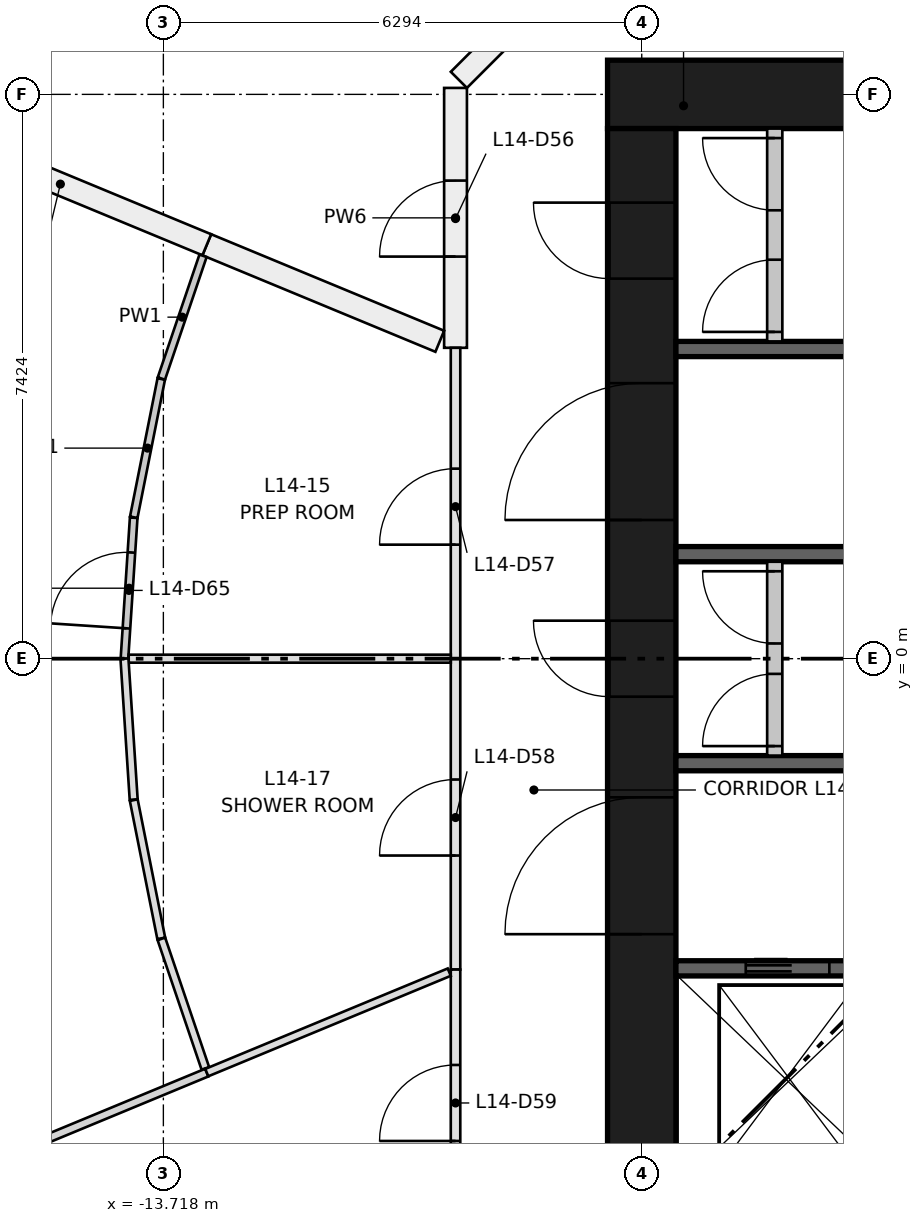
"""IFC4 building model, lengths in metres.
Left out: names, types, materials, properties, quantities, classifications, styles, units other than length and angle.
Written with IfcOpenShell. Run it as: python <this file> out.ifc"""

import sys

from ifc_helpers import new_model, si_unit, direction, frame, frame_2d, origin, place, context, subcontext, project, spatial, rectangle, extrude, element, fill, save


model = new_model("IFC4")
c1 = context("Model", 3, precision=1e-05, world=origin(), true_north=direction((0.0, 1.0)))
c2 = subcontext(c1, "Body", "Model", "MODEL_VIEW")
j1 = project(units=[si_unit("LENGTHUNIT", "METRE"), si_unit("PLANEANGLEUNIT", "RADIAN")], contexts=[c1])
p1 = place(None, origin())
s1 = spatial("IfcSite", under=j1, at=p1, CompositionType="ELEMENT")
p2 = place(p1, origin())
s2 = spatial("IfcBuilding", under=s1, at=p2, CompositionType="ELEMENT")
p3 = place(p2, frame((0.0, 0.0, 55.4)))
s3 = spatial("IfcBuildingStorey", under=s2, at=p3, CompositionType="ELEMENT", Elevation=55.4)
p4 = place(p3, frame((-7.874, 7.424, 0.0), z_axis=(0.0, 0.0, 1.0), x_axis=(1.0, 0.0, 0.0)))
e1 = element("IfcWall", 1, at=p4, inside=s3, PredefinedType="SHEAR", context=c2, shape_type="SweptSolid", body=[
    extrude(rectangle(XDim=15.748, YDim=0.9, at=frame_2d((7.874, 0.0))), origin(), (0.0, 0.0, 1.0), 3.65),
])
p5 = place(p3, frame((-7.424, -6.974, 0.0), z_axis=(0.0, 0.0, 1.0), x_axis=(0.0, 1.0, 0.0)))
e2 = element("IfcWall", 2, at=p5, inside=s3, PredefinedType="SHEAR", context=c2, shape_type="SweptSolid", body=[
    extrude(rectangle(XDim=13.948, YDim=0.9, at=frame_2d((6.974, 0.0))), origin(), (0.0, 0.0, 1.0), 3.65),
])
p6 = place(p5, frame((6.474, 0.0, 0.0)))
e3 = element("IfcOpeningElement", 3, at=p6, cuts=e2, PredefinedType="OPENING", context=c2, shape_type="SweptSolid", body=[
    extrude(rectangle(XDim=1.0, YDim=2.1, at=frame_2d((0.5, 1.05))), frame((0.0, 0.46, 0.0), z_axis=(0.0, -1.0, 0.0), x_axis=(1.0, 0.0, 0.0)), (0.0, 0.0, 1.0), 0.92),
])
p7 = place(p5, frame((3.35, 0.0, 0.0)))
e4 = element("IfcOpeningElement", 4, at=p7, cuts=e2, PredefinedType="OPENING", context=c2, shape_type="SweptSolid", body=[
    extrude(rectangle(XDim=1.8, YDim=2.1, at=frame_2d((0.9, 1.05))), frame((0.0, 0.46, 0.0), z_axis=(0.0, -1.0, 0.0), x_axis=(1.0, 0.0, 0.0)), (0.0, 0.0, 1.0), 0.92),
])
p8 = place(p5, frame((8.799, 0.0, 0.0)))
e5 = element("IfcOpeningElement", 5, at=p8, cuts=e2, PredefinedType="OPENING", context=c2, shape_type="SweptSolid", body=[
    extrude(rectangle(XDim=1.8, YDim=2.1, at=frame_2d((0.9, 1.05))), frame((0.0, 0.46, 0.0), z_axis=(0.0, -1.0, 0.0), x_axis=(1.0, 0.0, 0.0)), (0.0, 0.0, 1.0), 0.92),
])
p9 = place(p5, frame((11.974, 0.0, 0.0)))
e6 = element("IfcOpeningElement", 6, at=p9, cuts=e2, PredefinedType="OPENING", context=c2, shape_type="SweptSolid", body=[
    extrude(rectangle(XDim=1.0, YDim=2.1, at=frame_2d((0.5, 1.05))), frame((0.0, 0.46, 0.0), z_axis=(0.0, -1.0, 0.0), x_axis=(1.0, 0.0, 0.0)), (0.0, 0.0, 1.0), 0.92),
])
p10 = place(p3, frame((-6.974, -4.074, 0.0), z_axis=(0.0, 0.0, 1.0), x_axis=(1.0, 0.0, 0.0)))
e7 = element("IfcWall", 7, at=p10, inside=s3, PredefinedType="SHEAR", context=c2, shape_type="SweptSolid", body=[
    extrude(rectangle(XDim=13.948, YDim=0.2, at=frame_2d((6.974, 0.0))), origin(), (0.0, 0.0, 1.0), 3.3),
])
p11 = place(p10, frame((0.918, 0.0, 0.0)))
e8 = element("IfcOpeningElement", 8, at=p11, cuts=e7, PredefinedType="OPENING", context=c2, shape_type="SweptSolid", body=[
    extrude(rectangle(XDim=1.1, YDim=2.1, at=frame_2d((0.55, 1.05))), frame((0.0, 0.11, 0.0), z_axis=(0.0, -1.0, 0.0), x_axis=(1.0, 0.0, 0.0)), (0.0, 0.0, 1.0), 0.22),
])
p12 = place(p10, frame((4.055, 0.0, 0.0)))
e9 = element("IfcOpeningElement", 9, at=p12, cuts=e7, PredefinedType="OPENING", context=c2, shape_type="SweptSolid", body=[
    extrude(rectangle(XDim=1.1, YDim=2.1, at=frame_2d((0.55, 1.05))), frame((0.0, 0.11, 0.0), z_axis=(0.0, -1.0, 0.0), x_axis=(1.0, 0.0, 0.0)), (0.0, 0.0, 1.0), 0.22),
])
p13 = place(p10, frame((6.658, 0.0, 0.0)))
e10 = element("IfcOpeningElement", 10, at=p13, cuts=e7, PredefinedType="OPENING", context=c2, shape_type="SweptSolid", body=[
    extrude(rectangle(XDim=1.0, YDim=2.1, at=frame_2d((0.5, 1.05))), frame((0.0, 0.11, 0.0), z_axis=(0.0, -1.0, 0.0), x_axis=(1.0, 0.0, 0.0)), (0.0, 0.0, 1.0), 0.22),
])
p14 = place(p10, frame((8.627, 0.0, 0.0)))
e11 = element("IfcOpeningElement", 11, at=p14, cuts=e7, PredefinedType="OPENING", context=c2, shape_type="SweptSolid", body=[
    extrude(rectangle(XDim=1.0, YDim=2.1, at=frame_2d((0.5, 1.05))), frame((0.0, 0.11, 0.0), z_axis=(0.0, -1.0, 0.0), x_axis=(1.0, 0.0, 0.0)), (0.0, 0.0, 1.0), 0.22),
])
p15 = place(p10, frame((10.595, 0.0, 0.0)))
e12 = element("IfcOpeningElement", 12, at=p15, cuts=e7, PredefinedType="OPENING", context=c2, shape_type="SweptSolid", body=[
    extrude(rectangle(XDim=1.0, YDim=2.1, at=frame_2d((0.5, 1.05))), frame((0.0, 0.11, 0.0), z_axis=(0.0, -1.0, 0.0), x_axis=(1.0, 0.0, 0.0)), (0.0, 0.0, 1.0), 0.22),
])
p16 = place(p10, frame((12.564, 0.0, 0.0)))
e13 = element("IfcOpeningElement", 13, at=p16, cuts=e7, PredefinedType="OPENING", context=c2, shape_type="SweptSolid", body=[
    extrude(rectangle(XDim=1.0, YDim=2.1, at=frame_2d((0.5, 1.05))), frame((0.0, 0.11, 0.0), z_axis=(0.0, -1.0, 0.0), x_axis=(1.0, 0.0, 0.0)), (0.0, 0.0, 1.0), 0.22),
])
p17 = place(p3, frame((-6.974, 4.074, 0.0), z_axis=(0.0, 0.0, 1.0), x_axis=(1.0, 0.0, 0.0)))
e14 = element("IfcWall", 14, at=p17, inside=s3, PredefinedType="SHEAR", context=c2, shape_type="SweptSolid", body=[
    extrude(rectangle(XDim=6.974, YDim=0.2, at=frame_2d((3.487, 0.0))), origin(), (0.0, 0.0, 1.0), 3.3),
])
for number, where, z_axis, x_axis in (
    (15, (-6.974, -1.375, 0.0), (0.0, 0.0, 1.0), (1.0, 0.0, 0.0)),
    (16, (-6.974, 1.375, 0.0), (0.0, 0.0, 1.0), (1.0, 0.0, 0.0)),
):
    element("IfcWall", number, at=place(p3, frame(where, z_axis=z_axis, x_axis=x_axis)), inside=s3, PredefinedType="SHEAR", context=c2, shape_type="SweptSolid", body=[
        extrude(rectangle(XDim=2.6, YDim=0.2, at=frame_2d((1.3, 0.0))), origin(), (0.0, 0.0, 1.0), 3.3),
    ])
p18 = place(p3, frame((-5.674, -1.275, 0.0), z_axis=(0.0, 0.0, 1.0), x_axis=(0.0, 1.0, 0.0)))
e17 = element("IfcWall", 17, at=p18, inside=s3, PredefinedType="PARTITIONING", context=c2, shape_type="SweptSolid", body=[
    extrude(rectangle(XDim=2.55, YDim=0.2, at=frame_2d((1.275, 0.0))), origin(), (0.0, 0.0, 1.0), 3.3),
])
p19 = place(p18, frame((0.125, 0.0, 0.0)))
e18 = element("IfcOpeningElement", 18, at=p19, cuts=e17, PredefinedType="OPENING", context=c2, shape_type="SweptSolid", body=[
    extrude(rectangle(XDim=0.95, YDim=2.1, at=frame_2d((0.475, 1.05))), frame((0.0, 0.11, 0.0), z_axis=(0.0, -1.0, 0.0), x_axis=(1.0, 0.0, 0.0)), (0.0, 0.0, 1.0), 0.22),
])
p20 = place(p18, frame((1.475, 0.0, 0.0)))
e19 = element("IfcOpeningElement", 19, at=p20, cuts=e17, PredefinedType="OPENING", context=c2, shape_type="SweptSolid", body=[
    extrude(rectangle(XDim=0.95, YDim=2.1, at=frame_2d((0.475, 1.05))), frame((0.0, 0.11, 0.0), z_axis=(0.0, -1.0, 0.0), x_axis=(1.0, 0.0, 0.0)), (0.0, 0.0, 1.0), 0.22),
])
p21 = place(p3, frame((-5.674, 4.174, 0.0), z_axis=(0.0, 0.0, 1.0), x_axis=(0.0, 1.0, 0.0)))
e20 = element("IfcWall", 20, at=p21, inside=s3, PredefinedType="PARTITIONING", context=c2, shape_type="SweptSolid", body=[
    extrude(rectangle(XDim=2.8, YDim=0.2, at=frame_2d((1.4, 0.0))), origin(), (0.0, 0.0, 1.0), 3.3),
])
p22 = place(p21, frame((0.125, 0.0, 0.0)))
e21 = element("IfcOpeningElement", 21, at=p22, cuts=e20, PredefinedType="OPENING", context=c2, shape_type="SweptSolid", body=[
    extrude(rectangle(XDim=0.95, YDim=2.1, at=frame_2d((0.475, 1.05))), frame((0.0, 0.11, 0.0), z_axis=(0.0, -1.0, 0.0), x_axis=(1.0, 0.0, 0.0)), (0.0, 0.0, 1.0), 0.22),
])
p23 = place(p21, frame((1.725, 0.0, 0.0)))
e22 = element("IfcOpeningElement", 22, at=p23, cuts=e20, PredefinedType="OPENING", context=c2, shape_type="SweptSolid", body=[
    extrude(rectangle(XDim=0.95, YDim=2.1, at=frame_2d((0.475, 1.05))), frame((0.0, 0.11, 0.0), z_axis=(0.0, -1.0, 0.0), x_axis=(1.0, 0.0, 0.0)), (0.0, 0.0, 1.0), 0.22),
])
p24 = place(p3, frame((-9.874, 4.09, 0.0), z_axis=(0.0, 0.0, 1.0), x_axis=(0.0, 1.0, 0.0)))
e23 = element("IfcWall", 23, at=p24, inside=s3, PredefinedType="PARTITIONING", context=c2, shape_type="SweptSolid", body=[
    extrude(rectangle(XDim=3.419, YDim=0.3, at=frame_2d((1.709, 0.0))), origin(), (0.0, 0.0, 1.0), 3.3),
])
p25 = place(p24, frame((1.2, 0.0, 0.0)))
e24 = element("IfcOpeningElement", 24, at=p25, cuts=e23, PredefinedType="OPENING", context=c2, shape_type="SweptSolid", body=[
    extrude(rectangle(XDim=1.0, YDim=2.1, at=frame_2d((0.5, 1.05))), frame((0.0, 0.16, 0.0), z_axis=(0.0, -1.0, 0.0), x_axis=(1.0, 0.0, 0.0)), (0.0, 0.0, 1.0), 0.32),
])
p26 = place(p3, frame((-9.83, 7.615, 0.0), z_axis=(0.0, 0.0, 1.0), x_axis=(0.70718471217, 0.707028841614, 0.0)))
e25 = element("IfcWall", 25, at=p26, inside=s3, PredefinedType="PARTITIONING", context=c2, shape_type="SweptSolid", body=[
    extrude(rectangle(XDim=1.566, YDim=0.3, at=frame_2d((0.783, 0.0))), origin(), (0.0, 0.0, 1.0), 3.3),
])
p27 = place(p3, frame((-9.874, 0.0, 0.0), z_axis=(0.0, 0.0, 1.0), x_axis=(0.0, 1.0, 0.0)))
e26 = element("IfcWall", 26, at=p27, inside=s3, PredefinedType="PARTITIONING", context=c2, shape_type="SweptSolid", body=[
    extrude(rectangle(XDim=4.09, YDim=0.125, at=frame_2d((2.045, 0.0))), origin(), (0.0, 0.0, 1.0), 3.3),
])
p28 = place(p27, frame((1.5, 0.0, 0.0)))
e27 = element("IfcOpeningElement", 27, at=p28, cuts=e26, PredefinedType="OPENING", context=c2, shape_type="SweptSolid", body=[
    extrude(rectangle(XDim=1.0, YDim=2.1, at=frame_2d((0.5, 1.05))), frame((0.0, 0.073, 0.0), z_axis=(0.0, -1.0, 0.0), x_axis=(1.0, 0.0, 0.0)), (0.0, 0.0, 1.0), 0.145),
])
p29 = place(p3, frame((-9.874, -4.09, 0.0), z_axis=(0.0, 0.0, 1.0), x_axis=(0.0, 1.0, 0.0)))
e28 = element("IfcWall", 28, at=p29, inside=s3, PredefinedType="PARTITIONING", context=c2, shape_type="SweptSolid", body=[
    extrude(rectangle(XDim=4.09, YDim=0.125, at=frame_2d((2.045, 0.0))), origin(), (0.0, 0.0, 1.0), 3.3),
])
p30 = place(p29, frame((1.5, 0.0, 0.0)))
e29 = element("IfcOpeningElement", 29, at=p30, cuts=e28, PredefinedType="OPENING", context=c2, shape_type="SweptSolid", body=[
    extrude(rectangle(XDim=1.0, YDim=2.1, at=frame_2d((0.5, 1.05))), frame((0.0, 0.073, 0.0), z_axis=(0.0, -1.0, 0.0), x_axis=(1.0, 0.0, 0.0)), (0.0, 0.0, 1.0), 0.145),
])
p31 = place(p3, frame((-9.874, -7.545, 0.0), z_axis=(0.0, 0.0, 1.0), x_axis=(0.0, 1.0, 0.0)))
e30 = element("IfcWall", 30, at=p31, inside=s3, PredefinedType="PARTITIONING", context=c2, shape_type="SweptSolid", body=[
    extrude(rectangle(XDim=3.455, YDim=0.125, at=frame_2d((1.728, 0.0))), origin(), (0.0, 0.0, 1.0), 3.3),
])
p32 = place(p31, frame((1.2, 0.0, 0.0)))
e31 = element("IfcOpeningElement", 31, at=p32, cuts=e30, PredefinedType="OPENING", context=c2, shape_type="SweptSolid", body=[
    extrude(rectangle(XDim=1.0, YDim=2.1, at=frame_2d((0.5, 1.05))), frame((0.0, 0.073, 0.0), z_axis=(0.0, -1.0, 0.0), x_axis=(1.0, 0.0, 0.0)), (0.0, 0.0, 1.0), 0.145),
])
p33 = place(p3, frame((-10.081, 4.176, 0.0), z_axis=(0.0, 0.0, 1.0), x_axis=(-0.923876033225, 0.382691880281, 0.0)))
e32 = element("IfcWall", 32, at=p33, inside=s3, PredefinedType="PARTITIONING", context=c2, shape_type="SweptSolid", body=[
    extrude(rectangle(XDim=3.318, YDim=0.3, at=frame_2d((1.659, 0.0))), origin(), (0.0, 0.0, 1.0), 3.3),
])
p34 = place(p3, frame((-13.147, 5.446, 0.0), z_axis=(0.0, 0.0, 1.0), x_axis=(-0.923873410436, 0.382698212028, 0.0)))
e33 = element("IfcWall", 33, at=p34, inside=s3, PredefinedType="PARTITIONING", context=c2, shape_type="SweptSolid", body=[
    extrude(rectangle(XDim=4.17, YDim=0.3, at=frame_2d((2.085, 0.0))), origin(), (0.0, 0.0, 1.0), 3.3),
])
p35 = place(p3, frame((-14.23, 0.0, 0.0), z_axis=(0.0, 0.0, 1.0), x_axis=(0.065437532333, 0.997856667745, 0.0)))
e34 = element("IfcWall", 34, at=p35, inside=s3, PredefinedType="PARTITIONING", context=c2, shape_type="SweptSolid", body=[
    extrude(rectangle(XDim=1.858, YDim=0.1, at=frame_2d((0.929, 0.0))), origin(), (0.0, 0.0, 1.0), 3.3),
])
p36 = place(p35, frame((0.4, 0.0, 0.0)))
e35 = element("IfcOpeningElement", 35, at=p36, cuts=e34, PredefinedType="OPENING", context=c2, shape_type="SweptSolid", body=[
    extrude(rectangle(XDim=1.0, YDim=2.1, at=frame_2d((0.5, 1.05))), frame((0.0, 0.06, 0.0), z_axis=(0.0, -1.0, 0.0), x_axis=(1.0, 0.0, 0.0)), (0.0, 0.0, 1.0), 0.12),
])
p37 = place(p3, frame((-14.108, 1.861, 0.0), z_axis=(0.0, 0.0, 1.0), x_axis=(0.195204777565, 0.980762506836, 0.0)))
e36 = element("IfcWall", 36, at=p37, inside=s3, PredefinedType="PARTITIONING", context=c2, shape_type="SweptSolid", body=[
    extrude(rectangle(XDim=1.855, YDim=0.1, at=frame_2d((0.927, 0.0))), origin(), (0.0, 0.0, 1.0), 3.3),
])
p38 = place(p3, frame((-13.744, 3.686, 0.0), z_axis=(0.0, 0.0, 1.0), x_axis=(0.321250473512, 0.946994262532, 0.0)))
e37 = element("IfcWall", 37, at=p38, inside=s3, PredefinedType="PARTITIONING", context=c2, shape_type="SweptSolid", body=[
    extrude(rectangle(XDim=1.705, YDim=0.1, at=frame_2d((0.852, 0.0))), origin(), (0.0, 0.0, 1.0), 3.3),
])
p39 = place(p3, frame((-9.937, 0.0, 0.0), z_axis=(0.0, 0.0, 1.0), x_axis=(-1.0, 0.0, 0.0)))
e38 = element("IfcWall", 38, at=p39, inside=s3, PredefinedType="PARTITIONING", context=c2, shape_type="SweptSolid", body=[
    extrude(rectangle(XDim=4.237, YDim=0.105, at=frame_2d((2.119, 0.0))), origin(), (0.0, 0.0, 1.0), 3.3),
])
p40 = place(p3, frame((-14.23, 0.0, 0.0), z_axis=(0.0, 0.0, 1.0), x_axis=(0.065437532333, -0.997856667745, 0.0)))
e39 = element("IfcWall", 39, at=p40, inside=s3, PredefinedType="PARTITIONING", context=c2, shape_type="SweptSolid", body=[
    extrude(rectangle(XDim=1.858, YDim=0.105, at=frame_2d((0.929, 0.0))), origin(), (0.0, 0.0, 1.0), 3.3),
])
p41 = place(p3, frame((-14.108, -1.861, 0.0), z_axis=(0.0, 0.0, 1.0), x_axis=(0.195103348377, -0.980782689209, 0.0)))
e40 = element("IfcWall", 40, at=p41, inside=s3, PredefinedType="PARTITIONING", context=c2, shape_type="SweptSolid", body=[
    extrude(rectangle(XDim=1.854, YDim=0.105, at=frame_2d((0.927, 0.0))), origin(), (0.0, 0.0, 1.0), 3.3),
])
p42 = place(p3, frame((-13.744, -3.686, 0.0), z_axis=(0.0, 0.0, 1.0), x_axis=(0.321433227273, -0.946932246998, 0.0)))
e41 = element("IfcWall", 41, at=p42, inside=s3, PredefinedType="PARTITIONING", context=c2, shape_type="SweptSolid", body=[
    extrude(rectangle(XDim=1.799, YDim=0.105, at=frame_2d((0.9, 0.0))), origin(), (0.0, 0.0, 1.0), 3.3),
])
p43 = place(p3, frame((-13.147, -5.446, 0.0), z_axis=(0.0, 0.0, 1.0), x_axis=(-0.923873410436, -0.382698212028, 0.0)))
e42 = element("IfcWall", 42, at=p43, inside=s3, PredefinedType="PARTITIONING", context=c2, shape_type="SweptSolid", body=[
    extrude(rectangle(XDim=4.17, YDim=0.11, at=frame_2d((2.085, 0.0))), origin(), (0.0, 0.0, 1.0), 3.3),
])
p44 = place(p3, frame((-9.957, -4.124, 0.0), z_axis=(0.0, 0.0, 1.0), x_axis=(-0.923867748948, -0.382711879165, 0.0)))
e43 = element("IfcWall", 43, at=p44, inside=s3, PredefinedType="PARTITIONING", context=c2, shape_type="SweptSolid", body=[
    extrude(rectangle(XDim=3.453, YDim=0.105, at=frame_2d((1.727, 0.0))), origin(), (0.0, 0.0, 1.0), 3.3),
])
p45 = place(p11, origin())
e44 = element("IfcDoor", 44, at=p45, inside=s3, OperationType="DOUBLE_DOOR_SLIDING", PredefinedType="DOOR", context=c2, shape_type="SweptSolid", body=[
    extrude(rectangle(XDim=1.1, YDim=2.1, at=frame_2d((0.55, 1.05))), frame((0.0, 0.025, 0.0), z_axis=(0.0, -1.0, 0.0), x_axis=(1.0, 0.0, 0.0)), (0.0, 0.0, 1.0), 0.05),
])
fill(e8, e44)
p46 = place(p19, origin())
e45 = element("IfcDoor", 45, at=p46, inside=s3, OperationType="SINGLE_SWING_LEFT", PredefinedType="DOOR", context=c2, shape_type="SweptSolid", body=[
    extrude(rectangle(XDim=0.95, YDim=2.1, at=frame_2d((0.475, 1.05))), frame((0.0, 0.025, 0.0), z_axis=(0.0, -1.0, 0.0), x_axis=(1.0, 0.0, 0.0)), (0.0, 0.0, 1.0), 0.05),
])
fill(e18, e45)
p47 = place(p20, origin())
e46 = element("IfcDoor", 46, at=p47, inside=s3, OperationType="SINGLE_SWING_RIGHT", PredefinedType="DOOR", context=c2, shape_type="SweptSolid", body=[
    extrude(rectangle(XDim=0.95, YDim=2.1, at=frame_2d((0.475, 1.05))), frame((0.0, 0.025, 0.0), z_axis=(0.0, -1.0, 0.0), x_axis=(1.0, 0.0, 0.0)), (0.0, 0.0, 1.0), 0.05),
])
fill(e19, e46)
p48 = place(p22, origin())
e47 = element("IfcDoor", 47, at=p48, inside=s3, OperationType="SINGLE_SWING_LEFT", PredefinedType="DOOR", context=c2, shape_type="SweptSolid", body=[
    extrude(rectangle(XDim=0.95, YDim=2.1, at=frame_2d((0.475, 1.05))), frame((0.0, 0.025, 0.0), z_axis=(0.0, -1.0, 0.0), x_axis=(1.0, 0.0, 0.0)), (0.0, 0.0, 1.0), 0.05),
])
fill(e21, e47)
p49 = place(p23, origin())
e48 = element("IfcDoor", 48, at=p49, inside=s3, OperationType="SINGLE_SWING_RIGHT", PredefinedType="DOOR", context=c2, shape_type="SweptSolid", body=[
    extrude(rectangle(XDim=0.95, YDim=2.1, at=frame_2d((0.475, 1.05))), frame((0.0, 0.025, 0.0), z_axis=(0.0, -1.0, 0.0), x_axis=(1.0, 0.0, 0.0)), (0.0, 0.0, 1.0), 0.05),
])
fill(e22, e48)
p50 = place(p6, origin())
e49 = element("IfcDoor", 49, at=p50, inside=s3, OperationType="SINGLE_SWING_RIGHT", PredefinedType="DOOR", context=c2, shape_type="SweptSolid", body=[
    extrude(rectangle(XDim=1.0, YDim=2.1, at=frame_2d((0.5, 1.05))), frame((0.0, 0.45, 0.0), z_axis=(0.0, -1.0, 0.0), x_axis=(1.0, 0.0, 0.0)), (0.0, 0.0, 1.0), 0.05),
])
fill(e3, e49)
p51 = place(p7, origin())
e50 = element("IfcDoor", 50, at=p51, inside=s3, OperationType="DOUBLE_DOOR_SINGLE_SWING", PredefinedType="DOOR", context=c2, shape_type="SweptSolid", body=[
    extrude(rectangle(XDim=1.8, YDim=2.1, at=frame_2d((0.9, 1.05))), frame((0.0, 0.025, 0.0), z_axis=(0.0, -1.0, 0.0), x_axis=(1.0, 0.0, 0.0)), (0.0, 0.0, 1.0), 0.05),
])
fill(e4, e50)
p52 = place(p8, origin())
e51 = element("IfcDoor", 51, at=p52, inside=s3, OperationType="DOUBLE_DOOR_SINGLE_SWING", PredefinedType="DOOR", context=c2, shape_type="SweptSolid", body=[
    extrude(rectangle(XDim=1.8, YDim=2.1, at=frame_2d((0.9, 1.05))), frame((0.0, 0.025, 0.0), z_axis=(0.0, -1.0, 0.0), x_axis=(1.0, 0.0, 0.0)), (0.0, 0.0, 1.0), 0.05),
])
fill(e5, e51)
p53 = place(p9, origin())
e52 = element("IfcDoor", 52, at=p53, inside=s3, OperationType="SINGLE_SWING_RIGHT", PredefinedType="DOOR", context=c2, shape_type="SweptSolid", body=[
    extrude(rectangle(XDim=1.0, YDim=2.1, at=frame_2d((0.5, 1.05))), frame((0.0, 0.45, 0.0), z_axis=(0.0, -1.0, 0.0), x_axis=(1.0, 0.0, 0.0)), (0.0, 0.0, 1.0), 0.05),
])
fill(e6, e52)
p54 = place(p25, origin())
e53 = element("IfcDoor", 53, at=p54, inside=s3, OperationType="SINGLE_SWING_LEFT", PredefinedType="DOOR", context=c2, shape_type="SweptSolid", body=[
    extrude(rectangle(XDim=1.0, YDim=2.1, at=frame_2d((0.5, 1.05))), frame((0.0, 0.025, 0.0), z_axis=(0.0, -1.0, 0.0), x_axis=(1.0, 0.0, 0.0)), (0.0, 0.0, 1.0), 0.05),
])
fill(e24, e53)
p55 = place(p28, origin())
e54 = element("IfcDoor", 54, at=p55, inside=s3, OperationType="SINGLE_SWING_LEFT", PredefinedType="DOOR", context=c2, shape_type="SweptSolid", body=[
    extrude(rectangle(XDim=1.0, YDim=2.1, at=frame_2d((0.5, 1.05))), frame((0.0, 0.025, 0.0), z_axis=(0.0, -1.0, 0.0), x_axis=(1.0, 0.0, 0.0)), (0.0, 0.0, 1.0), 0.05),
])
fill(e27, e54)
p56 = place(p30, origin())
e55 = element("IfcDoor", 55, at=p56, inside=s3, OperationType="SINGLE_SWING_LEFT", PredefinedType="DOOR", context=c2, shape_type="SweptSolid", body=[
    extrude(rectangle(XDim=1.0, YDim=2.1, at=frame_2d((0.5, 1.05))), frame((0.0, 0.025, 0.0), z_axis=(0.0, -1.0, 0.0), x_axis=(1.0, 0.0, 0.0)), (0.0, 0.0, 1.0), 0.05),
])
fill(e29, e55)
p57 = place(p32, origin())
e56 = element("IfcDoor", 56, at=p57, inside=s3, OperationType="SINGLE_SWING_LEFT", PredefinedType="DOOR", context=c2, shape_type="SweptSolid", body=[
    extrude(rectangle(XDim=1.0, YDim=2.1, at=frame_2d((0.5, 1.05))), frame((0.0, 0.025, 0.0), z_axis=(0.0, -1.0, 0.0), x_axis=(1.0, 0.0, 0.0)), (0.0, 0.0, 1.0), 0.05),
])
fill(e31, e56)
p58 = place(p36, origin())
e57 = element("IfcDoor", 57, at=p58, inside=s3, OperationType="SINGLE_SWING_LEFT", PredefinedType="DOOR", context=c2, shape_type="SweptSolid", body=[
    extrude(rectangle(XDim=1.0, YDim=2.1, at=frame_2d((0.5, 1.05))), frame((0.0, 0.025, 0.0), z_axis=(0.0, -1.0, 0.0), x_axis=(1.0, 0.0, 0.0)), (0.0, 0.0, 1.0), 0.05),
])
fill(e35, e57)
save(model, sys.argv[1])
